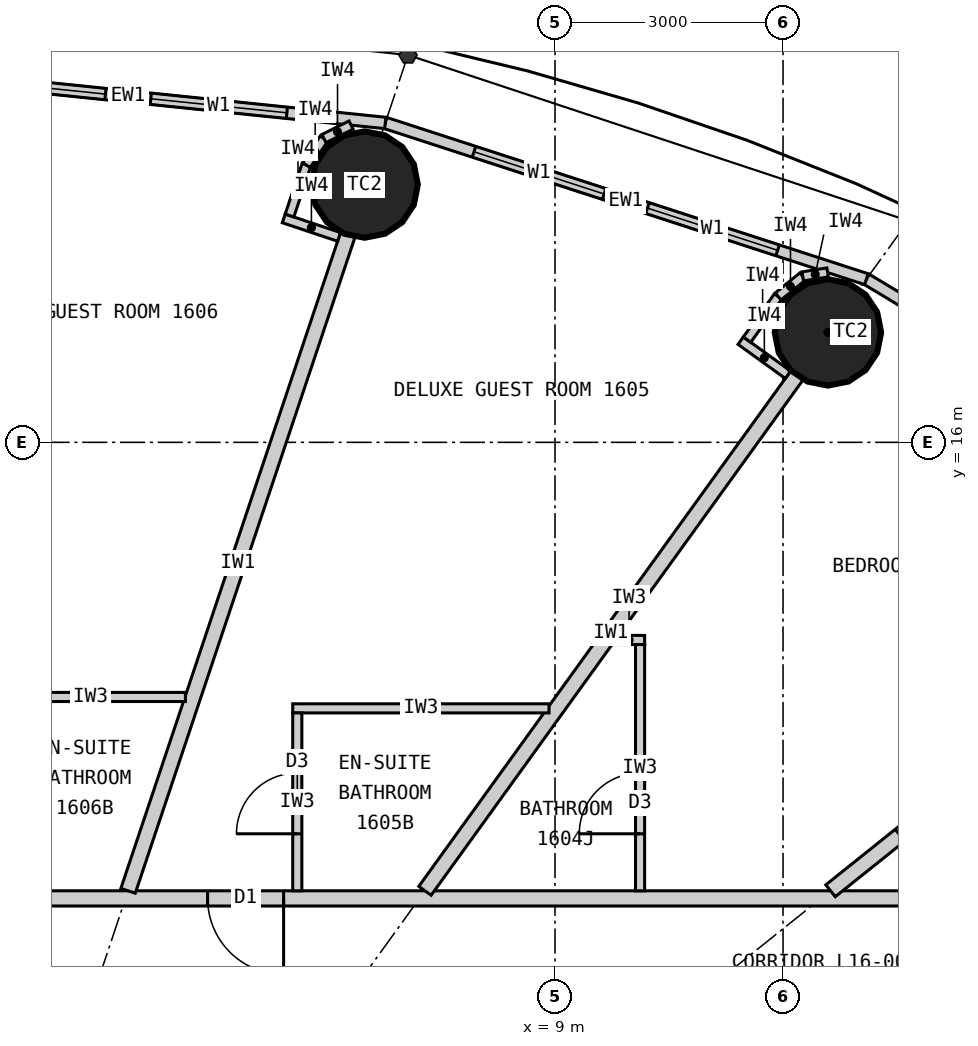
"""IFC4 building model, lengths in metres.
Left out: names, types, materials, properties, quantities, classifications, styles, units other than length and angle.
Written with IfcOpenShell. Run it as: python <this file> out.ifc"""

import sys

from ifc_helpers import new_model, si_unit, direction, frame, frame_2d, origin, origin_2d, place, context, subcontext, project, spatial, rectangle, circle, extrude, element, fill, save


model = new_model("IFC4")
c1 = context("Model", 3, precision=1e-05, world=origin(), true_north=direction((0.0, 1.0)))
c2 = subcontext(c1, "Body", "Model", "MODEL_VIEW")
j1 = project(units=[si_unit("LENGTHUNIT", "METRE"), si_unit("PLANEANGLEUNIT", "RADIAN")], contexts=[c1])
p1 = place(None, origin())
s1 = spatial("IfcSite", under=j1, at=p1, CompositionType="ELEMENT")
p2 = place(p1, origin())
s2 = spatial("IfcBuilding", under=s1, at=p2, CompositionType="ELEMENT")
p3 = place(p2, frame((0.0, 0.0, 67.2)))
s3 = spatial("IfcBuildingStorey", under=s2, at=p3, CompositionType="ELEMENT", Elevation=67.2)
for number, where, z_axis, x_axis in (
    (1, (12.591, 17.447, 0.0), (0.0, 0.0, 1.0), (1.0, 0.0, 0.0)),
    (2, (6.495, 19.391, 0.0), (0.0, 0.0, 1.0), (1.0, 0.0, 0.0)),
):
    element("IfcColumn", number, at=place(p3, frame(where, z_axis=z_axis, x_axis=x_axis)), inside=s3, PredefinedType="COLUMN", context=c2, shape_type="SweptSolid", body=[
        extrude(circle(Radius=0.7, at=origin_2d()), origin(), (0.0, 0.0, 1.0), 3.3),
    ])
p4 = place(p3, frame((18.57, 14.856, 0.0), z_axis=(0.0, 0.0, 1.0), x_axis=(-0.856983180864, 0.515344377787, 0.0)))
e3 = element("IfcWall", 3, at=p4, inside=s3, PredefinedType="ELEMENTEDWALL", context=c2, shape_type="SweptSolid", body=[
    extrude(rectangle(XDim=6.386, YDim=0.15, at=frame_2d((3.193, 0.0))), origin(), (0.0, 0.0, 1.0), 3.12),
])
p5 = place(p4, frame((1.093, 0.0, 0.9)))
e4 = element("IfcOpeningElement", 4, at=p5, cuts=e3, PredefinedType="OPENING", context=c2, shape_type="SweptSolid", body=[
    extrude(rectangle(XDim=1.8, YDim=1.9, at=frame_2d((0.9, 0.95))), frame((0.0, 0.085, 0.0), z_axis=(0.0, -1.0, 0.0), x_axis=(1.0, 0.0, 0.0)), (0.0, 0.0, 1.0), 0.17),
])
p6 = place(p4, frame((3.493, 0.0, 0.9)))
e5 = element("IfcOpeningElement", 5, at=p6, cuts=e3, PredefinedType="OPENING", context=c2, shape_type="SweptSolid", body=[
    extrude(rectangle(XDim=1.8, YDim=1.9, at=frame_2d((0.9, 0.95))), frame((0.0, 0.085, 0.0), z_axis=(0.0, -1.0, 0.0), x_axis=(1.0, 0.0, 0.0)), (0.0, 0.0, 1.0), 0.17),
])
p7 = place(p3, frame((13.096, 18.147, 0.0), z_axis=(0.0, 0.0, 1.0), x_axis=(-0.951137534625, 0.308767534285, 0.0)))
e6 = element("IfcWall", 6, at=p7, inside=s3, PredefinedType="ELEMENTEDWALL", context=c2, shape_type="SweptSolid", body=[
    extrude(rectangle(XDim=6.655, YDim=0.15, at=frame_2d((3.328, 0.0))), origin(), (0.0, 0.0, 1.0), 3.12),
])
p8 = place(p7, frame((1.228, 0.0, 0.9)))
e7 = element("IfcOpeningElement", 7, at=p8, cuts=e6, PredefinedType="OPENING", context=c2, shape_type="SweptSolid", body=[
    extrude(rectangle(XDim=1.8, YDim=1.9, at=frame_2d((0.9, 0.95))), frame((0.0, 0.085, 0.0), z_axis=(0.0, -1.0, 0.0), x_axis=(1.0, 0.0, 0.0)), (0.0, 0.0, 1.0), 0.17),
])
p9 = place(p7, frame((3.628, 0.0, 0.9)))
e8 = element("IfcOpeningElement", 8, at=p9, cuts=e6, PredefinedType="OPENING", context=c2, shape_type="SweptSolid", body=[
    extrude(rectangle(XDim=1.8, YDim=1.9, at=frame_2d((0.9, 0.95))), frame((0.0, 0.085, 0.0), z_axis=(0.0, -1.0, 0.0), x_axis=(1.0, 0.0, 0.0)), (0.0, 0.0, 1.0), 0.17),
])
p10 = place(p3, frame((6.766, 20.202, 0.0), z_axis=(0.0, 0.0, 1.0), x_axis=(-0.994721394369, 0.102612609291, 0.0)))
e9 = element("IfcWall", 9, at=p10, inside=s3, PredefinedType="ELEMENTEDWALL", context=c2, shape_type="SweptSolid", body=[
    extrude(rectangle(XDim=6.802, YDim=0.15, at=frame_2d((3.401, 0.0))), origin(), (0.0, 0.0, 1.0), 3.12),
])
p11 = place(p10, frame((1.301, 0.0, 0.9)))
e10 = element("IfcOpeningElement", 10, at=p11, cuts=e9, PredefinedType="OPENING", context=c2, shape_type="SweptSolid", body=[
    extrude(rectangle(XDim=1.8, YDim=1.9, at=frame_2d((0.9, 0.95))), frame((0.0, 0.085, 0.0), z_axis=(0.0, -1.0, 0.0), x_axis=(1.0, 0.0, 0.0)), (0.0, 0.0, 1.0), 0.17),
])
p12 = place(p10, frame((3.701, 0.0, 0.9)))
e11 = element("IfcOpeningElement", 11, at=p12, cuts=e9, PredefinedType="OPENING", context=c2, shape_type="SweptSolid", body=[
    extrude(rectangle(XDim=1.8, YDim=1.9, at=frame_2d((0.9, 0.95))), frame((0.0, 0.085, 0.0), z_axis=(0.0, -1.0, 0.0), x_axis=(1.0, 0.0, 0.0)), (0.0, 0.0, 1.0), 0.17),
])
p13 = place(p3, frame((-14.1, 10.0, 0.0), z_axis=(0.0, 0.0, 1.0), x_axis=(1.0, 0.0, 0.0)))
e12 = element("IfcWall", 12, at=p13, inside=s3, PredefinedType="PARTITIONING", context=c2, shape_type="SweptSolid", body=[
    extrude(rectangle(XDim=28.2, YDim=0.2, at=frame_2d((14.1, 0.0))), origin(), (0.0, 0.0, 1.0), 3.12),
])
p14 = place(p13, frame((18.529, 0.0, 0.0)))
e13 = element("IfcOpeningElement", 13, at=p14, cuts=e12, PredefinedType="OPENING", context=c2, shape_type="SweptSolid", body=[
    extrude(rectangle(XDim=1.0, YDim=2.2, at=frame_2d((0.5, 1.1))), frame((0.0, 0.11, 0.0), z_axis=(0.0, -1.0, 0.0), x_axis=(1.0, 0.0, 0.0)), (0.0, 0.0, 1.0), 0.22),
])
p15 = place(p13, frame((14.623, 0.0, 0.0)))
e14 = element("IfcOpeningElement", 14, at=p15, cuts=e12, PredefinedType="OPENING", context=c2, shape_type="SweptSolid", body=[
    extrude(rectangle(XDim=1.0, YDim=2.2, at=frame_2d((0.5, 1.1))), frame((0.0, 0.11, 0.0), z_axis=(0.0, -1.0, 0.0), x_axis=(1.0, 0.0, 0.0)), (0.0, 0.0, 1.0), 0.22),
])
p16 = place(p13, frame((11.24, 0.0, 0.0)))
e15 = element("IfcOpeningElement", 15, at=p16, cuts=e12, PredefinedType="OPENING", context=c2, shape_type="SweptSolid", body=[
    extrude(rectangle(XDim=1.0, YDim=2.2, at=frame_2d((0.5, 1.1))), frame((0.0, 0.11, 0.0), z_axis=(0.0, -1.0, 0.0), x_axis=(1.0, 0.0, 0.0)), (0.0, 0.0, 1.0), 0.22),
])
p17 = place(p13, frame((8.671, 0.0, 0.0)))
e16 = element("IfcOpeningElement", 16, at=p17, cuts=e12, PredefinedType="OPENING", context=c2, shape_type="SweptSolid", body=[
    extrude(rectangle(XDim=1.0, YDim=2.2, at=frame_2d((0.5, 1.1))), frame((0.0, 0.11, 0.0), z_axis=(0.0, -1.0, 0.0), x_axis=(1.0, 0.0, 0.0)), (0.0, 0.0, 1.0), 0.22),
])
p18 = place(p13, frame((2.801, 0.0, 0.0)))
e17 = element("IfcOpeningElement", 17, at=p18, cuts=e12, PredefinedType="OPENING", context=c2, shape_type="SweptSolid", body=[
    extrude(rectangle(XDim=1.0, YDim=2.2, at=frame_2d((0.5, 1.1))), frame((0.0, 0.11, 0.0), z_axis=(0.0, -1.0, 0.0), x_axis=(1.0, 0.0, 0.0)), (0.0, 0.0, 1.0), 0.22),
])
p19 = place(p3, frame((12.625, 10.1, 0.0), z_axis=(0.0, 0.0, 1.0), x_axis=(0.780892451574, 0.624665493744, 0.0)))
e18 = element("IfcWall", 18, at=p19, inside=s3, PredefinedType="PARTITIONING", context=c2, shape_type="SweptSolid", body=[
    extrude(rectangle(XDim=6.045, YDim=0.2, at=frame_2d((3.022, 0.0))), origin(), (0.0, 0.0, 1.0), 2.32),
])
p20 = place(p19, frame((1.17, 0.0, 0.0)))
e19 = element("IfcOpeningElement", 19, at=p20, cuts=e18, PredefinedType="OPENING", context=c2, shape_type="SweptSolid", body=[
    extrude(rectangle(XDim=0.9, YDim=2.1, at=frame_2d((0.45, 1.05))), frame((0.0, 0.11, 0.0), z_axis=(0.0, -1.0, 0.0), x_axis=(1.0, 0.0, 0.0)), (0.0, 0.0, 1.0), 0.22),
])
p21 = place(p3, frame((7.289, 10.1, 0.0), z_axis=(0.0, 0.0, 1.0), x_axis=(0.585198353053, 0.810890182197, 0.0)))
e20 = element("IfcWall", 20, at=p21, inside=s3, PredefinedType="PARTITIONING", context=c2, shape_type="SweptSolid", body=[
    extrude(rectangle(XDim=8.36, YDim=0.2, at=frame_2d((4.18, 0.0))), origin(), (0.0, 0.0, 1.0), 2.32),
])
p22 = place(p3, frame((3.383, 10.1, 0.0), z_axis=(0.0, 0.0, 1.0), x_axis=(0.31759592231, 0.948226149256, 0.0)))
e21 = element("IfcWall", 21, at=p22, inside=s3, PredefinedType="PARTITIONING", context=c2, shape_type="SweptSolid", body=[
    extrude(rectangle(XDim=9.098, YDim=0.2, at=frame_2d((4.549, 0.0))), origin(), (0.0, 0.0, 1.0), 2.32),
])
p23 = place(p3, frame((9.771, 13.4, 0.0), z_axis=(0.0, 0.0, 1.0), x_axis=(1.0, 0.0, 0.0)))
e22 = element("IfcWall", 22, at=p23, inside=s3, PredefinedType="PARTITIONING", context=c2, shape_type="SweptSolid", body=[
    extrude(rectangle(XDim=0.408, YDim=0.12, at=frame_2d((0.204, 0.0))), origin(), (0.0, 0.0, 1.0), 3.12),
])
p24 = place(p3, frame((10.119, 10.1, 0.0), z_axis=(0.0, 0.0, 1.0), x_axis=(0.0, 1.0, 0.0)))
e23 = element("IfcWall", 23, at=p24, inside=s3, PredefinedType="PARTITIONING", context=c2, shape_type="SweptSolid", body=[
    extrude(rectangle(XDim=3.24, YDim=0.12, at=frame_2d((1.62, 0.0))), origin(), (0.0, 0.0, 1.0), 3.12),
])
p25 = place(p24, frame((0.75, 0.0, 0.0)))
e24 = element("IfcOpeningElement", 24, at=p25, cuts=e23, PredefinedType="OPENING", context=c2, shape_type="SweptSolid", body=[
    extrude(rectangle(XDim=0.8, YDim=2.1, at=frame_2d((0.4, 1.05))), frame((0.0, 0.07, 0.0), z_axis=(0.0, -1.0, 0.0), x_axis=(1.0, 0.0, 0.0)), (0.0, 0.0, 1.0), 0.14),
])
p26 = place(p3, frame((8.921, 12.5, 0.0), z_axis=(0.0, 0.0, 1.0), x_axis=(-1.0, 0.0, 0.0)))
e25 = element("IfcWall", 25, at=p26, inside=s3, PredefinedType="PARTITIONING", context=c2, shape_type="SweptSolid", body=[
    extrude(rectangle(XDim=3.372, YDim=0.12, at=frame_2d((1.686, 0.0))), origin(), (0.0, 0.0, 1.0), 3.12),
])
p27 = place(p3, frame((5.609, 10.1, 0.0), z_axis=(0.0, 0.0, 1.0), x_axis=(0.0, 1.0, 0.0)))
e26 = element("IfcWall", 26, at=p27, inside=s3, PredefinedType="PARTITIONING", context=c2, shape_type="SweptSolid", body=[
    extrude(rectangle(XDim=2.34, YDim=0.12, at=frame_2d((1.17, 0.0))), origin(), (0.0, 0.0, 1.0), 3.12),
])
p28 = place(p27, frame((0.75, 0.0, 0.0)))
e27 = element("IfcOpeningElement", 27, at=p28, cuts=e26, PredefinedType="OPENING", context=c2, shape_type="SweptSolid", body=[
    extrude(rectangle(XDim=0.8, YDim=2.1, at=frame_2d((0.4, 1.05))), frame((0.0, 0.07, 0.0), z_axis=(0.0, -1.0, 0.0), x_axis=(1.0, 0.0, 0.0)), (0.0, 0.0, 1.0), 0.14),
])
p29 = place(p3, frame((4.137, 12.65, 0.0), z_axis=(0.0, 0.0, 1.0), x_axis=(-1.0, 0.0, 0.0)))
e28 = element("IfcWall", 28, at=p29, inside=s3, PredefinedType="PARTITIONING", context=c2, shape_type="SweptSolid", body=[
    extrude(rectangle(XDim=2.494, YDim=0.12, at=frame_2d((1.247, 0.0))), origin(), (0.0, 0.0, 1.0), 3.12),
])
p30 = place(p3, frame((12.065, 16.889, 0.0), z_axis=(0.0, 0.0, 1.0), x_axis=(-0.810821798253, 0.585293098778, 0.0)))
e29 = element("IfcWall", 29, at=p30, inside=s3, PredefinedType="PARTITIONING", context=c2, shape_type="SweptSolid", body=[
    extrude(rectangle(XDim=0.768, YDim=0.12, at=frame_2d((0.384, 0.0))), origin(), (0.0, 0.0, 1.0), 3.12),
])
p31 = place(p3, frame((11.526, 17.351, 0.0), z_axis=(0.0, 0.0, 1.0), x_axis=(0.585223113993, 0.810872312296, 0.0)))
e30 = element("IfcWall", 30, at=p31, inside=s3, PredefinedType="PARTITIONING", context=c2, shape_type="SweptSolid", body=[
    extrude(rectangle(XDim=0.7, YDim=0.12, at=frame_2d((0.35, 0.0))), origin(), (0.0, 0.0, 1.0), 3.12),
])
p32 = place(p3, frame((11.936, 17.919, 0.0), z_axis=(0.0, 0.0, 1.0), x_axis=(0.775023088441, 0.631932917629, 0.0)))
e31 = element("IfcWall", 31, at=p32, inside=s3, PredefinedType="PARTITIONING", context=c2, shape_type="SweptSolid", body=[
    extrude(rectangle(XDim=0.418, YDim=0.12, at=frame_2d((0.209, 0.0))), origin(), (0.0, 0.0, 1.0), 3.12),
])
p33 = place(p3, frame((12.26, 18.183, 0.0), z_axis=(0.0, 0.0, 1.0), x_axis=(0.987218661664, 0.159371622511, 0.0)))
e32 = element("IfcWall", 32, at=p33, inside=s3, PredefinedType="PARTITIONING", context=c2, shape_type="SweptSolid", body=[
    extrude(rectangle(XDim=0.331, YDim=0.12, at=frame_2d((0.166, 0.0))), origin(), (0.0, 0.0, 1.0), 3.12),
])
p34 = place(p3, frame((6.159, 18.702, 0.0), z_axis=(0.0, 0.0, 1.0), x_axis=(-0.948173154049, 0.31775410295, 0.0)))
e33 = element("IfcWall", 33, at=p34, inside=s3, PredefinedType="PARTITIONING", context=c2, shape_type="SweptSolid", body=[
    extrude(rectangle(XDim=0.768, YDim=0.12, at=frame_2d((0.384, 0.0))), origin(), (0.0, 0.0, 1.0), 3.12),
])
p35 = place(p3, frame((5.507, 18.984, 0.0), z_axis=(0.0, 0.0, 1.0), x_axis=(0.317692050622, 0.948193946918, 0.0)))
e34 = element("IfcWall", 34, at=p35, inside=s3, PredefinedType="PARTITIONING", context=c2, shape_type="SweptSolid", body=[
    extrude(rectangle(XDim=0.7, YDim=0.12, at=frame_2d((0.35, 0.0))), origin(), (0.0, 0.0, 1.0), 3.12),
])
p36 = place(p3, frame((5.729, 19.648, 0.0), z_axis=(0.0, 0.0, 1.0), x_axis=(0.552135764955, 0.833754218615, 0.0)))
e35 = element("IfcWall", 35, at=p36, inside=s3, PredefinedType="PARTITIONING", context=c2, shape_type="SweptSolid", body=[
    extrude(rectangle(XDim=0.418, YDim=0.12, at=frame_2d((0.209, 0.0))), origin(), (0.0, 0.0, 1.0), 3.12),
])
p37 = place(p3, frame((5.96, 19.996, 0.0), z_axis=(0.0, 0.0, 1.0), x_axis=(0.895160725913, 0.445743507842, 0.0)))
e36 = element("IfcWall", 36, at=p37, inside=s3, PredefinedType="PARTITIONING", context=c2, shape_type="SweptSolid", body=[
    extrude(rectangle(XDim=0.399, YDim=0.12, at=frame_2d((0.199, 0.0))), origin(), (0.0, 0.0, 1.0), 3.12),
])
p38 = place(p8, origin())
e37 = element("IfcWindow", 37, at=p38, inside=s3, PartitioningType="SINGLE_PANEL", PredefinedType="WINDOW", context=c2, shape_type="SweptSolid", body=[
    extrude(rectangle(XDim=1.8, YDim=1.9, at=frame_2d((0.9, 0.95))), frame((0.0, 0.03, 0.0), z_axis=(0.0, -1.0, 0.0), x_axis=(1.0, 0.0, 0.0)), (0.0, 0.0, 1.0), 0.06),
])
fill(e7, e37)
p39 = place(p9, origin())
e38 = element("IfcWindow", 38, at=p39, inside=s3, PartitioningType="SINGLE_PANEL", PredefinedType="WINDOW", context=c2, shape_type="SweptSolid", body=[
    extrude(rectangle(XDim=1.8, YDim=1.9, at=frame_2d((0.9, 0.95))), frame((0.0, 0.03, 0.0), z_axis=(0.0, -1.0, 0.0), x_axis=(1.0, 0.0, 0.0)), (0.0, 0.0, 1.0), 0.06),
])
fill(e8, e38)
p40 = place(p11, origin())
e39 = element("IfcWindow", 39, at=p40, inside=s3, PartitioningType="SINGLE_PANEL", PredefinedType="WINDOW", context=c2, shape_type="SweptSolid", body=[
    extrude(rectangle(XDim=1.8, YDim=1.9, at=frame_2d((0.9, 0.95))), frame((0.0, 0.03, 0.0), z_axis=(0.0, -1.0, 0.0), x_axis=(1.0, 0.0, 0.0)), (0.0, 0.0, 1.0), 0.06),
])
fill(e10, e39)
p41 = place(p12, origin())
e40 = element("IfcWindow", 40, at=p41, inside=s3, PartitioningType="SINGLE_PANEL", PredefinedType="WINDOW", context=c2, shape_type="SweptSolid", body=[
    extrude(rectangle(XDim=1.8, YDim=1.9, at=frame_2d((0.9, 0.95))), frame((0.0, 0.03, 0.0), z_axis=(0.0, -1.0, 0.0), x_axis=(1.0, 0.0, 0.0)), (0.0, 0.0, 1.0), 0.06),
])
fill(e11, e40)
p42 = place(p25, origin())
e41 = element("IfcDoor", 41, at=p42, inside=s3, OperationType="SINGLE_SWING_LEFT", PredefinedType="DOOR", context=c2, shape_type="SweptSolid", body=[
    extrude(rectangle(XDim=0.8, YDim=2.1, at=frame_2d((0.4, 1.05))), frame((0.0, 0.025, 0.0), z_axis=(0.0, -1.0, 0.0), x_axis=(1.0, 0.0, 0.0)), (0.0, 0.0, 1.0), 0.05),
])
fill(e24, e41)
p43 = place(p28, origin())
e42 = element("IfcDoor", 42, at=p43, inside=s3, OperationType="SINGLE_SWING_LEFT", PredefinedType="DOOR", context=c2, shape_type="SweptSolid", body=[
    extrude(rectangle(XDim=0.8, YDim=2.1, at=frame_2d((0.4, 1.05))), frame((0.0, 0.025, 0.0), z_axis=(0.0, -1.0, 0.0), x_axis=(1.0, 0.0, 0.0)), (0.0, 0.0, 1.0), 0.05),
])
fill(e27, e42)
p44 = place(p14, origin())
e43 = element("IfcDoor", 43, at=p44, inside=s3, OperationType="SINGLE_SWING_RIGHT", PredefinedType="DOOR", context=c2, shape_type="SweptSolid", body=[
    extrude(rectangle(XDim=1.0, YDim=2.2, at=frame_2d((0.5, 1.1))), frame((0.0, 0.025, 0.0), z_axis=(0.0, -1.0, 0.0), x_axis=(1.0, 0.0, 0.0)), (0.0, 0.0, 1.0), 0.05),
])
fill(e13, e43)
save(model, sys.argv[1])
